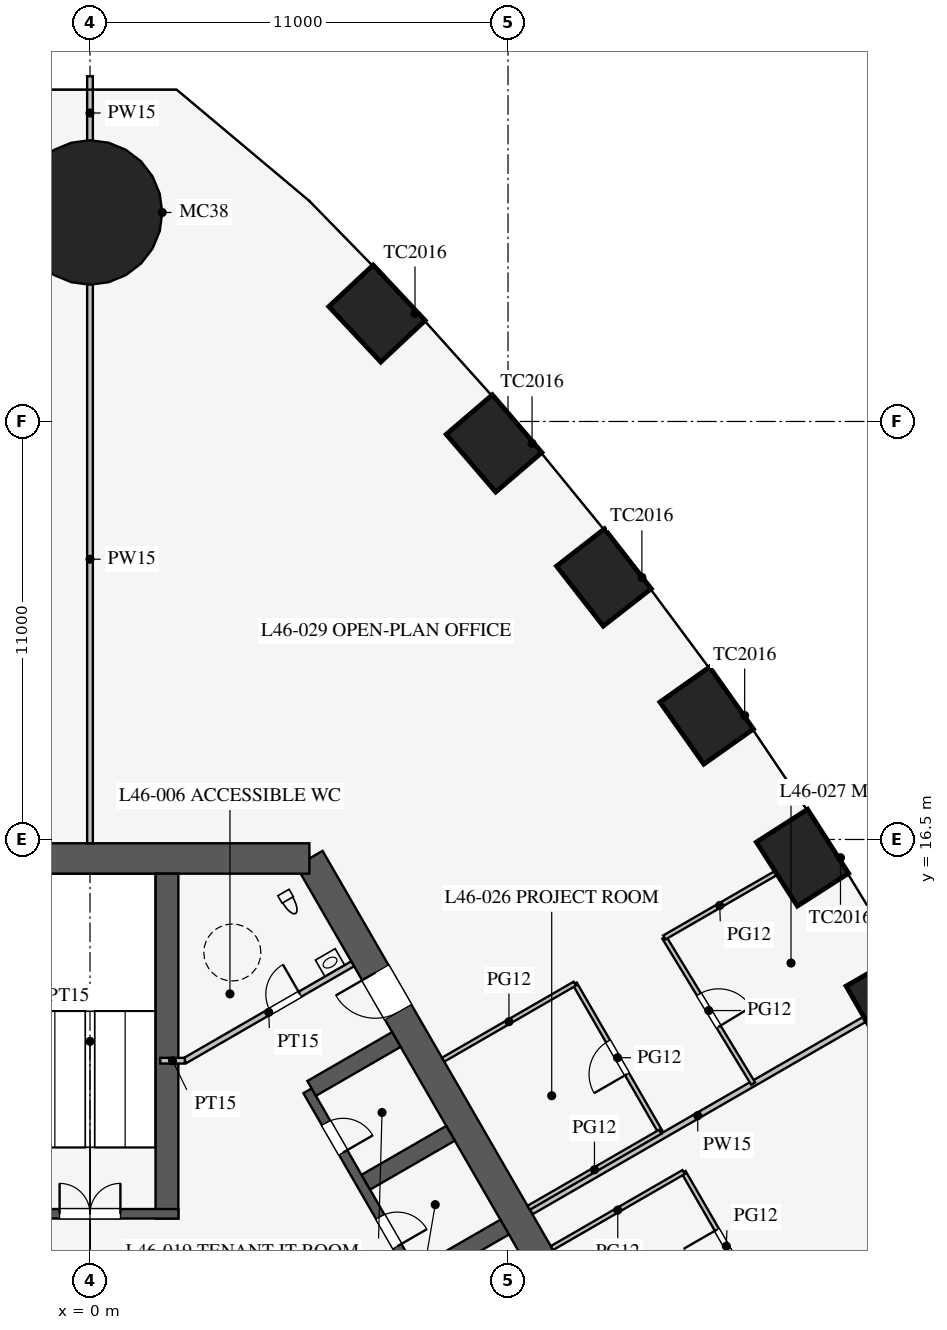
"""IFC4 building model, lengths in metres.
Left out: names, types, materials, properties, quantities, classifications, styles, units other than length and angle.
Written with IfcOpenShell. Run it as: python <this file> out.ifc"""

import sys

from ifc_helpers import new_model, si_unit, direction, frame, frame_2d, origin, origin_2d, place, context, subcontext, project, spatial, rectangle, circle, extrude, element, fill, save


model = new_model("IFC4")
c1 = context("Model", 3, precision=1e-05, world=origin(), true_north=direction((0.0, 1.0)))
c2 = subcontext(c1, "Body", "Model", "MODEL_VIEW")
j1 = project(units=[si_unit("LENGTHUNIT", "METRE"), si_unit("PLANEANGLEUNIT", "RADIAN")], contexts=[c1])
p1 = place(None, origin())
s1 = spatial("IfcSite", under=j1, at=p1, CompositionType="ELEMENT")
p2 = place(p1, origin())
s2 = spatial("IfcBuilding", under=s1, at=p2, CompositionType="ELEMENT")
p3 = place(p2, frame((0.0, 0.0, 202.3)))
s3 = spatial("IfcBuildingStorey", under=s2, at=p3, CompositionType="ELEMENT", Elevation=202.3)
for number, where, z_axis, x_axis in (
    (1, (21.088, 12.175, 0.0), (0.0, 0.0, 1.0), (-0.5, 0.866, 0.0)),
    (2, (18.748, 16.02, 0.0), (0.0, 0.0, 1.0), (-0.539, 0.842, 0.0)),
    (3, (16.227, 19.761, 0.0), (0.0, 0.0, 1.0), (-0.577, 0.816, 0.0)),
    (4, (13.522, 23.396, 0.0), (0.0, 0.0, 1.0), (-0.615, 0.789, 0.0)),
    (5, (10.632, 26.923, 0.0), (0.0, 0.0, 1.0), (-0.651, 0.759, 0.0)),
    (6, (7.552, 30.341, 0.0), (0.0, 0.0, 1.0), (-0.684, 0.73, 0.0)),
):
    element("IfcColumn", number, at=place(p3, frame(where, z_axis=z_axis, x_axis=x_axis)), inside=s3, PredefinedType="COLUMN", context=c2, shape_type="SweptSolid", body=[
        extrude(rectangle(XDim=2.0, YDim=1.6, at=origin_2d()), origin(), (0.0, 0.0, 1.0), 4.2),
    ])
p4 = place(p3, frame((0.0, 33.0, 0.0), z_axis=(0.0, 0.0, 1.0), x_axis=(1.0, 0.0, 0.0)))
e7 = element("IfcColumn", 7, at=p4, inside=s3, PredefinedType="COLUMN", context=c2, shape_type="SweptSolid", body=[
    extrude(circle(Radius=1.9, at=origin_2d()), origin(), (0.0, 0.0, 1.0), 4.2),
])
p5 = place(p3, frame((16.743, -3.0, 0.0), z_axis=(0.0, 0.0, 1.0), x_axis=(-0.500002442456, 0.866023993627, 0.0)))
e8 = element("IfcWall", 8, at=p5, inside=s3, PredefinedType="SHEAR", context=c2, shape_type="SweptSolid", body=[
    extrude(rectangle(XDim=21.939, YDim=0.8, at=frame_2d((10.97, 0.0))), origin(), (0.0, 0.0, 1.0), 4.2),
])
p6 = place(p5, frame((17.27, 0.0, 0.0)))
e9 = element("IfcOpeningElement", 9, at=p6, cuts=e8, PredefinedType="OPENING", context=c2, shape_type="SweptSolid", body=[
    extrude(rectangle(XDim=1.2, YDim=2.1, at=frame_2d((0.6, 1.05))), frame((0.0, 0.41, 0.0), z_axis=(0.0, -1.0, 0.0), x_axis=(1.0, 0.0, 0.0)), (0.0, 0.0, 1.0), 0.82),
])
p7 = place(p5, frame((3.47, 0.0, 0.0)))
e10 = element("IfcOpeningElement", 10, at=p7, cuts=e8, PredefinedType="OPENING", context=c2, shape_type="SweptSolid", body=[
    extrude(rectangle(XDim=1.2, YDim=2.1, at=frame_2d((0.6, 1.05))), frame((0.0, 0.41, 0.0), z_axis=(0.0, -1.0, 0.0), x_axis=(1.0, 0.0, 0.0)), (0.0, 0.0, 1.0), 0.82),
])
p8 = place(p3, frame((5.773, 16.0, 0.0), z_axis=(0.0, 0.0, 1.0), x_axis=(-1.0, 0.0, 0.0)))
e11 = element("IfcWall", 11, at=p8, inside=s3, PredefinedType="SHEAR", context=c2, shape_type="SweptSolid", body=[
    extrude(rectangle(XDim=11.547, YDim=0.8, at=frame_2d((5.773, 0.0))), origin(), (0.0, 0.0, 1.0), 4.2),
])
p9 = place(p3, frame((11.424, 0.014, 0.0), z_axis=(0.0, 0.0, 1.0), x_axis=(-0.500001763848, 0.866024385424, 0.0)))
e12 = element("IfcWall", 12, at=p9, inside=s3, PredefinedType="SHEAR", context=c2, shape_type="SweptSolid", body=[
    extrude(rectangle(XDim=11.4, YDim=0.25, at=frame_2d((5.7, 0.0))), origin(), (0.0, 0.0, 1.0), 4.2),
])
p10 = place(p9, frame((0.975, 0.0, 0.0)))
e13 = element("IfcOpeningElement", 13, at=p10, cuts=e12, PredefinedType="OPENING", context=c2, shape_type="SweptSolid", body=[
    extrude(rectangle(XDim=0.9, YDim=2.1, at=frame_2d((0.45, 1.05))), frame((0.0, 0.135, 0.0), z_axis=(0.0, -1.0, 0.0), x_axis=(1.0, 0.0, 0.0)), (0.0, 0.0, 1.0), 0.27),
])
p11 = place(p9, frame((3.825, 0.0, 0.0)))
e14 = element("IfcOpeningElement", 14, at=p11, cuts=e12, PredefinedType="OPENING", context=c2, shape_type="SweptSolid", body=[
    extrude(rectangle(XDim=0.9, YDim=2.1, at=frame_2d((0.45, 1.05))), frame((0.0, 0.135, 0.0), z_axis=(0.0, -1.0, 0.0), x_axis=(1.0, 0.0, 0.0)), (0.0, 0.0, 1.0), 0.27),
])
p12 = place(p9, frame((6.675, 0.0, 0.0)))
e15 = element("IfcOpeningElement", 15, at=p12, cuts=e12, PredefinedType="OPENING", context=c2, shape_type="SweptSolid", body=[
    extrude(rectangle(XDim=0.9, YDim=2.1, at=frame_2d((0.45, 1.05))), frame((0.0, 0.135, 0.0), z_axis=(0.0, -1.0, 0.0), x_axis=(1.0, 0.0, 0.0)), (0.0, 0.0, 1.0), 0.27),
])
p13 = place(p9, frame((9.525, 0.0, 0.0)))
e16 = element("IfcOpeningElement", 16, at=p13, cuts=e12, PredefinedType="OPENING", context=c2, shape_type="SweptSolid", body=[
    extrude(rectangle(XDim=0.9, YDim=2.1, at=frame_2d((0.45, 1.05))), frame((0.0, 0.135, 0.0), z_axis=(0.0, -1.0, 0.0), x_axis=(1.0, 0.0, 0.0)), (0.0, 0.0, 1.0), 0.27),
])
for number, where, z_axis, x_axis in (
    (17, (8.682, 5.012, 0.0), (0.0, 0.0, 1.0), (0.866, 0.5, 0.0)),
    (18, (7.257, 7.481, 0.0), (0.0, 0.0, 1.0), (0.866, 0.5, 0.0)),
):
    element("IfcWall", number, at=place(p3, frame(where, z_axis=z_axis, x_axis=x_axis)), inside=s3, PredefinedType="SHEAR", context=c2, shape_type="SweptSolid", body=[
        extrude(rectangle(XDim=2.575, YDim=0.45, at=frame_2d((1.288, 0.0))), origin(), (0.0, 0.0, 1.0), 4.2),
    ])
p14 = place(p3, frame((5.832, 9.949, 0.0), z_axis=(0.0, 0.0, 1.0), x_axis=(0.866029291668, 0.499993265928, 0.0)))
e19 = element("IfcWall", 19, at=p14, inside=s3, PredefinedType="SHEAR", context=c2, shape_type="SweptSolid", body=[
    extrude(rectangle(XDim=2.575, YDim=0.45, at=frame_2d((1.288, 0.0))), origin(), (0.0, 0.0, 1.0), 4.2),
])
p15 = place(p3, frame((2.025, 6.525, 0.0), z_axis=(0.0, 0.0, 1.0), x_axis=(0.0, 1.0, 0.0)))
e20 = element("IfcWall", 20, at=p15, inside=s3, PredefinedType="SHEAR", context=c2, shape_type="SweptSolid", body=[
    extrude(rectangle(XDim=9.075, YDim=0.6, at=frame_2d((4.538, 0.0))), origin(), (0.0, 0.0, 1.0), 4.2),
])
p16 = place(p3, frame((2.325, 6.65, 0.0), z_axis=(0.0, 0.0, 1.0), x_axis=(-1.0, 0.0, 0.0)))
e21 = element("IfcWall", 21, at=p16, inside=s3, PredefinedType="SHEAR", context=c2, shape_type="SweptSolid", body=[
    extrude(rectangle(XDim=4.65, YDim=0.25, at=frame_2d((2.325, 0.0))), origin(), (0.0, 0.0, 1.0), 4.2),
])
p17 = place(p16, frame((1.525, 0.0, 0.0)))
e22 = element("IfcOpeningElement", 22, at=p17, cuts=e21, PredefinedType="OPENING", context=c2, shape_type="SweptSolid", body=[
    extrude(rectangle(XDim=1.6, YDim=2.1, at=frame_2d((0.8, 1.05))), frame((0.0, 0.135, 0.0), z_axis=(0.0, -1.0, 0.0), x_axis=(1.0, 0.0, 0.0)), (0.0, 0.0, 1.0), 0.27),
])
p18 = place(p3, frame((2.495, 10.678, 0.0), z_axis=(0.0, 0.0, 1.0), x_axis=(0.86602216432, 0.500005610874, 0.0)))
e23 = element("IfcWall", 23, at=p18, inside=s3, PredefinedType="PARTITIONING", context=c2, shape_type="SweptSolid", body=[
    extrude(rectangle(XDim=5.1, YDim=0.15, at=frame_2d((2.55, 0.0))), origin(), (0.0, 0.0, 1.0), 4.0),
])
p19 = place(p18, frame((2.6, 0.0, 0.0)))
e24 = element("IfcOpeningElement", 24, at=p19, cuts=e23, PredefinedType="OPENING", context=c2, shape_type="SweptSolid", body=[
    extrude(rectangle(XDim=0.9, YDim=2.1, at=frame_2d((0.45, 1.05))), frame((0.0, 0.085, 0.0), z_axis=(0.0, -1.0, 0.0), x_axis=(1.0, 0.0, 0.0)), (0.0, 0.0, 1.0), 0.17),
])
p20 = place(p3, frame((2.495, 10.678, 0.0), z_axis=(0.0, 0.0, 1.0), x_axis=(-1.0, 0.0, 0.0)))
e25 = element("IfcWall", 25, at=p20, inside=s3, PredefinedType="PARTITIONING", context=c2, shape_type="SweptSolid", body=[
    extrude(rectangle(XDim=0.645, YDim=0.15, at=frame_2d((0.323, 0.0))), origin(), (0.0, 0.0, 1.0), 4.0),
])
p21 = place(p3, frame((0.0, 16.4, 0.0), z_axis=(0.0, 0.0, 1.0), x_axis=(0.0, 1.0, 0.0)))
e26 = element("IfcWall", 26, at=p21, inside=s3, PredefinedType="PARTITIONING", context=c2, shape_type="SweptSolid", body=[
    extrude(rectangle(XDim=14.95, YDim=0.15, at=frame_2d((7.475, 0.0))), origin(), (0.0, 0.0, 1.0), 2.4),
])
p22 = place(p3, frame((0.0, 34.65, 0.0), z_axis=(0.0, 0.0, 1.0), x_axis=(0.0, 1.0, 0.0)))
e27 = element("IfcWall", 27, at=p22, inside=s3, PredefinedType="PARTITIONING", context=c2, shape_type="SweptSolid", body=[
    extrude(rectangle(XDim=1.935, YDim=0.15, at=frame_2d((0.967, 0.0))), origin(), (0.0, 0.0, 1.0), 2.4),
])
p23 = place(p3, frame((11.613, 6.705, 0.0), z_axis=(0.0, 0.0, 1.0), x_axis=(0.866032382055, 0.499987913086, 0.0)))
e28 = element("IfcWall", 28, at=p23, inside=s3, PredefinedType="PARTITIONING", context=c2, shape_type="SweptSolid", body=[
    extrude(rectangle(XDim=10.111, YDim=0.15, at=frame_2d((5.055, 0.0))), origin(), (0.0, 0.0, 1.0), 3.3),
])
p24 = place(p3, frame((15.006, 8.808, 0.0), z_axis=(0.0, 0.0, 1.0), x_axis=(-0.500013631625, 0.866017533419, 0.0)))
e29 = element("IfcWall", 29, at=p24, inside=s3, PredefinedType="PARTITIONING", context=c2, shape_type="SweptSolid", body=[
    extrude(rectangle(XDim=4.5, YDim=0.12, at=frame_2d((2.25, 0.0))), origin(), (0.0, 0.0, 1.0), 2.9),
])
p25 = place(p24, frame((1.75, 0.0, 0.15)))
e30 = element("IfcOpeningElement", 30, at=p25, cuts=e29, PredefinedType="OPENING", context=c2, shape_type="SweptSolid", body=[
    extrude(rectangle(XDim=1.0, YDim=2.1, at=frame_2d((0.5, 1.05))), frame((0.0, 0.07, 0.0), z_axis=(0.0, -1.0, 0.0), x_axis=(1.0, 0.0, 0.0)), (0.0, 0.0, 1.0), 0.14),
])
p26 = place(p3, frame((17.869, 3.85, 0.0), z_axis=(0.0, 0.0, 1.0), x_axis=(-0.500013631625, 0.866017533419, 0.0)))
e31 = element("IfcWall", 31, at=p26, inside=s3, PredefinedType="PARTITIONING", context=c2, shape_type="SweptSolid", body=[
    extrude(rectangle(XDim=4.5, YDim=0.12, at=frame_2d((2.25, 0.0))), origin(), (0.0, 0.0, 1.0), 2.9),
])
p27 = place(p26, frame((1.75, 0.0, 0.15)))
e32 = element("IfcOpeningElement", 32, at=p27, cuts=e31, PredefinedType="OPENING", context=c2, shape_type="SweptSolid", body=[
    extrude(rectangle(XDim=1.0, YDim=2.1, at=frame_2d((0.5, 1.05))), frame((0.0, 0.07, 0.0), z_axis=(0.0, -1.0, 0.0), x_axis=(1.0, 0.0, 0.0)), (0.0, 0.0, 1.0), 0.14),
])
for number, where, z_axis, x_axis in (
    (33, (11.542, 6.808, 0.0), (0.0, 0.0, 1.0), (0.866, 0.5, 0.0)),
    (34, (9.292, 10.705, 0.0), (0.0, 0.0, 1.0), (0.866, 0.5, 0.0)),
    (35, (12.155, 5.747, 0.0), (0.0, 0.0, 1.0), (0.866, 0.5, 0.0)),
):
    element("IfcWall", number, at=place(p3, frame(where, z_axis=z_axis, x_axis=x_axis)), inside=s3, PredefinedType="PARTITIONING", context=c2, shape_type="SweptSolid", body=[
        extrude(rectangle(XDim=4.0, YDim=0.12, at=frame_2d((2.0, 0.0))), origin(), (0.0, 0.0, 1.0), 2.9),
    ])
p28 = place(p3, frame((17.451, 10.075, 0.0), z_axis=(0.0, 0.0, 1.0), x_axis=(-0.519790350351, 0.85429385558, 0.0)))
e36 = element("IfcWall", 36, at=p28, inside=s3, PredefinedType="PARTITIONING", context=c2, shape_type="SweptSolid", body=[
    extrude(rectangle(XDim=4.501, YDim=0.12, at=frame_2d((2.25, 0.0))), origin(), (0.0, 0.0, 1.0), 2.9),
])
p29 = place(p28, frame((1.75, 0.0, 0.15)))
e37 = element("IfcOpeningElement", 37, at=p29, cuts=e36, PredefinedType="OPENING", context=c2, shape_type="SweptSolid", body=[
    extrude(rectangle(XDim=1.0, YDim=2.1, at=frame_2d((0.5, 1.05))), frame((0.0, 0.07, 0.0), z_axis=(0.0, -1.0, 0.0), x_axis=(1.0, 0.0, 0.0)), (0.0, 0.0, 1.0), 0.14),
])
p30 = place(p3, frame((15.111, 13.921, 0.0), z_axis=(0.0, 0.0, 1.0), x_axis=(0.865999698775, 0.50004451974, 0.0)))
e38 = element("IfcWall", 38, at=p30, inside=s3, PredefinedType="PARTITIONING", context=c2, shape_type="SweptSolid", body=[
    extrude(rectangle(XDim=3.368, YDim=0.12, at=frame_2d((1.684, 0.0))), origin(), (0.0, 0.0, 1.0), 2.9),
])
p31 = place(p19, origin())
e39 = element("IfcDoor", 39, at=p31, inside=s3, OperationType="SINGLE_SWING_RIGHT", PredefinedType="DOOR", context=c2, shape_type="SweptSolid", body=[
    extrude(rectangle(XDim=0.9, YDim=2.1, at=frame_2d((0.45, 1.05))), frame((0.0, 0.025, 0.0), z_axis=(0.0, -1.0, 0.0), x_axis=(1.0, 0.0, 0.0)), (0.0, 0.0, 1.0), 0.05),
])
fill(e24, e39)
p32 = place(p17, frame((1.6, 0.0, 0.0), z_axis=(0.0, 0.0, 1.0), x_axis=(-1.0, 0.0, 0.0)))
e40 = element("IfcDoor", 40, at=p32, inside=s3, OperationType="DOUBLE_DOOR_SINGLE_SWING", PredefinedType="DOOR", context=c2, shape_type="SweptSolid", body=[
    extrude(rectangle(XDim=1.6, YDim=2.1, at=frame_2d((0.8, 1.05))), frame((0.0, 0.025, 0.0), z_axis=(0.0, -1.0, 0.0), x_axis=(1.0, 0.0, 0.0)), (0.0, 0.0, 1.0), 0.05),
])
fill(e22, e40)
p33 = place(p6, origin())
e41 = element("IfcDoor", 41, at=p33, inside=s3, OperationType="SINGLE_SWING_RIGHT", PredefinedType="DOOR", context=c2, shape_type="SweptSolid", body=[
    extrude(rectangle(XDim=1.2, YDim=2.1, at=frame_2d((0.6, 1.05))), frame((0.0, 0.025, 0.0), z_axis=(0.0, -1.0, 0.0), x_axis=(1.0, 0.0, 0.0)), (0.0, 0.0, 1.0), 0.05),
])
fill(e9, e41)
p34 = place(p12, frame((0.9, 0.0, 0.0), z_axis=(0.0, 0.0, 1.0), x_axis=(-1.0, 0.0, 0.0)))
e42 = element("IfcDoor", 42, at=p34, inside=s3, OperationType="SINGLE_SWING_RIGHT", PredefinedType="DOOR", context=c2, shape_type="SweptSolid", body=[
    extrude(rectangle(XDim=0.9, YDim=2.1, at=frame_2d((0.45, 1.05))), frame((0.0, 0.025, 0.0), z_axis=(0.0, -1.0, 0.0), x_axis=(1.0, 0.0, 0.0)), (0.0, 0.0, 1.0), 0.05),
])
fill(e15, e42)
p35 = place(p13, frame((0.9, 0.0, 0.0), z_axis=(0.0, 0.0, 1.0), x_axis=(-1.0, 0.0, 0.0)))
e43 = element("IfcDoor", 43, at=p35, inside=s3, OperationType="SINGLE_SWING_RIGHT", PredefinedType="DOOR", context=c2, shape_type="SweptSolid", body=[
    extrude(rectangle(XDim=0.9, YDim=2.1, at=frame_2d((0.45, 1.05))), frame((0.0, 0.025, 0.0), z_axis=(0.0, -1.0, 0.0), x_axis=(1.0, 0.0, 0.0)), (0.0, 0.0, 1.0), 0.05),
])
fill(e16, e43)
p36 = place(p27, origin())
e44 = element("IfcDoor", 44, at=p36, inside=s3, OperationType="SINGLE_SWING_RIGHT", PredefinedType="DOOR", context=c2, shape_type="SweptSolid", body=[
    extrude(rectangle(XDim=1.0, YDim=2.1, at=frame_2d((0.5, 1.05))), frame((0.0, 0.025, 0.0), z_axis=(0.0, -1.0, 0.0), x_axis=(1.0, 0.0, 0.0)), (0.0, 0.0, 1.0), 0.05),
])
fill(e32, e44)
p37 = place(p25, origin())
e45 = element("IfcDoor", 45, at=p37, inside=s3, OperationType="SINGLE_SWING_LEFT", PredefinedType="DOOR", context=c2, shape_type="SweptSolid", body=[
    extrude(rectangle(XDim=1.0, YDim=2.1, at=frame_2d((0.5, 1.05))), frame((0.0, 0.025, 0.0), z_axis=(0.0, -1.0, 0.0), x_axis=(1.0, 0.0, 0.0)), (0.0, 0.0, 1.0), 0.05),
])
fill(e30, e45)
p38 = place(p29, frame((1.0, 0.0, 0.0), z_axis=(0.0, 0.0, 1.0), x_axis=(-1.0, 0.0, 0.0)))
e46 = element("IfcDoor", 46, at=p38, inside=s3, OperationType="SINGLE_SWING_RIGHT", PredefinedType="DOOR", context=c2, shape_type="SweptSolid", body=[
    extrude(rectangle(XDim=1.0, YDim=2.1, at=frame_2d((0.5, 1.05))), frame((0.0, 0.025, 0.0), z_axis=(0.0, -1.0, 0.0), x_axis=(1.0, 0.0, 0.0)), (0.0, 0.0, 1.0), 0.05),
])
fill(e37, e46)
save(model, sys.argv[1])
